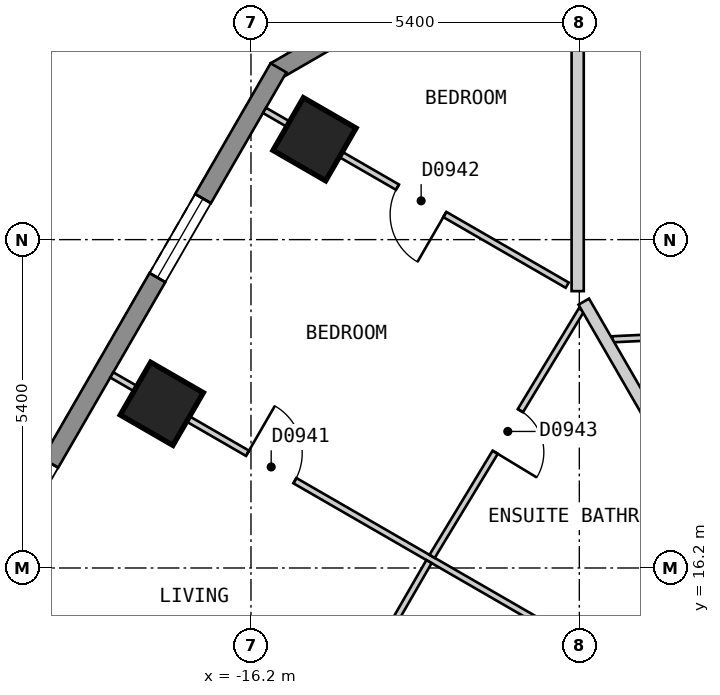
"""IFC4 building model, lengths in metres.
Left out: names, types, materials, properties, quantities, classifications, styles, units other than length and angle.
Written with IfcOpenShell. Run it as: python <this file> out.ifc"""

import sys

from ifc_helpers import new_model, si_unit, direction, frame, frame_2d, origin, origin_2d, place, context, subcontext, project, spatial, polyline, rectangle, outline, extrude, element, fill, save


model = new_model("IFC4")
c1 = context("Model", 3, precision=1e-05, world=origin(), true_north=direction((0.0, 1.0)))
c2 = subcontext(c1, "Body", "Model", "MODEL_VIEW")
j1 = project(units=[si_unit("LENGTHUNIT", "METRE"), si_unit("PLANEANGLEUNIT", "RADIAN")], contexts=[c1])
p1 = place(None, origin())
s1 = spatial("IfcSite", under=j1, at=p1, CompositionType="ELEMENT")
p2 = place(p1, origin())
s2 = spatial("IfcBuilding", under=s1, at=p2, CompositionType="ELEMENT")
p3 = place(p2, frame((0.0, 0.0, 90.0)))
s3 = spatial("IfcBuildingStorey", under=s2, at=p3, CompositionType="ELEMENT", Elevation=90.0)
for number, where, z_axis, x_axis in (
    (1, (-15.155, 23.251, 0.0), (0.0, 0.0, 1.0), (-0.5, -0.866, 0.0)),
    (2, (-17.667, 18.9, 0.0), (0.0, 0.0, 1.0), (-0.5, -0.866, 0.0)),
):
    element("IfcColumn", number, at=place(p3, frame(where, z_axis=z_axis, x_axis=x_axis)), inside=s3, PredefinedType="COLUMN", context=c2, shape_type="SweptSolid", body=[
        extrude(rectangle(XDim=1.0, YDim=1.0, at=origin_2d()), origin(), (0.0, 0.0, 1.0), 3.0),
    ])
p4 = place(p3, frame((-11.472, 26.87, 0.0), z_axis=(0.0, 0.0, 1.0), x_axis=(-0.866022959057, -0.500004234368, 0.0)))
e3 = element("IfcWall", 3, at=p4, inside=s3, PredefinedType="SOLIDWALL", context=c2, shape_type="SweptSolid", body=[
    extrude(outline(polyline([(0.0, -0.15), (5.0, -0.15), (4.92, 0.15), (0.08, 0.15), (0.0, -0.15)])), origin(), (0.0, 0.0, 1.0), 2.7),
])
p5 = place(p4, frame((0.65, 0.0, 0.15)))
e4 = element("IfcOpeningElement", 4, at=p5, cuts=e3, PredefinedType="OPENING", context=c2, shape_type="SweptSolid", body=[
    extrude(rectangle(XDim=1.2, YDim=2.1, at=frame_2d((0.6, 1.05))), frame((0.0, 0.16, 0.0), z_axis=(0.0, -1.0, 0.0), x_axis=(1.0, 0.0, 0.0)), (0.0, 0.0, 1.0), 0.32),
])
p6 = place(p3, frame((-15.747, 24.425, 0.0), z_axis=(0.0, 0.0, 1.0), x_axis=(-0.500027479704, -0.866009537788, 0.0)))
e5 = element("IfcWall", 5, at=p6, inside=s3, PredefinedType="SOLIDWALL", context=c2, shape_type="SweptSolid", body=[
    extrude(outline(polyline([(0.0, -0.15), (26.559, -0.15), (26.478, 0.15), (0.08, 0.15), (0.0, -0.15)])), origin(), (0.0, 0.0, 1.0), 2.7),
])
p7 = place(p6, frame((2.483, 0.0, 0.15)))
e6 = element("IfcOpeningElement", 6, at=p7, cuts=e5, PredefinedType="OPENING", context=c2, shape_type="SweptSolid", body=[
    extrude(rectangle(XDim=1.5, YDim=2.1, at=frame_2d((0.75, 1.05))), frame((0.0, 0.16, 0.0), z_axis=(0.0, -1.0, 0.0), x_axis=(1.0, 0.0, 0.0)), (0.0, 0.0, 1.0), 0.32),
])
p8 = place(p6, frame((7.506, 0.0, 0.15)))
e7 = element("IfcOpeningElement", 7, at=p8, cuts=e5, PredefinedType="OPENING", context=c2, shape_type="SweptSolid", body=[
    extrude(rectangle(XDim=1.5, YDim=2.1, at=frame_2d((0.75, 1.05))), frame((0.0, 0.16, 0.0), z_axis=(0.0, -1.0, 0.0), x_axis=(1.0, 0.0, 0.0)), (0.0, 0.0, 1.0), 0.32),
])
p9 = place(p6, frame((12.529, 0.0, 0.15)))
e8 = element("IfcOpeningElement", 8, at=p9, cuts=e5, PredefinedType="OPENING", context=c2, shape_type="SweptSolid", body=[
    extrude(rectangle(XDim=1.5, YDim=2.1, at=frame_2d((0.75, 1.05))), frame((0.0, 0.16, 0.0), z_axis=(0.0, -1.0, 0.0), x_axis=(1.0, 0.0, 0.0)), (0.0, 0.0, 1.0), 0.32),
])
p10 = place(p6, frame((17.552, 0.0, 0.15)))
e9 = element("IfcOpeningElement", 9, at=p10, cuts=e5, PredefinedType="OPENING", context=c2, shape_type="SweptSolid", body=[
    extrude(rectangle(XDim=1.5, YDim=2.1, at=frame_2d((0.75, 1.05))), frame((0.0, 0.16, 0.0), z_axis=(0.0, -1.0, 0.0), x_axis=(1.0, 0.0, 0.0)), (0.0, 0.0, 1.0), 0.32),
])
p11 = place(p6, frame((22.575, 0.0, 0.15)))
e10 = element("IfcOpeningElement", 10, at=p11, cuts=e5, PredefinedType="OPENING", context=c2, shape_type="SweptSolid", body=[
    extrude(rectangle(XDim=1.5, YDim=2.1, at=frame_2d((0.75, 1.05))), frame((0.0, 0.16, 0.0), z_axis=(0.0, -1.0, 0.0), x_axis=(1.0, 0.0, 0.0)), (0.0, 0.0, 1.0), 0.32),
])
p12 = place(p3, frame((-18.562, -0.951, 0.0), z_axis=(0.0, 0.0, 1.0), x_axis=(0.499987097491, 0.866032852923, 0.0)))
e11 = element("IfcWall", 11, at=p12, inside=s3, PredefinedType="PARTITIONING", context=c2, shape_type="SweptSolid", body=[
    extrude(rectangle(XDim=20.15, YDim=0.2, at=frame_2d((10.075, 0.0))), origin(), (0.0, 0.0, 1.0), 2.7),
])
p13 = place(p12, frame((14.627, 0.0, 0.0)))
e12 = element("IfcOpeningElement", 12, at=p13, cuts=e11, PredefinedType="OPENING", context=c2, shape_type="SweptSolid", body=[
    extrude(rectangle(XDim=1.0, YDim=2.1, at=frame_2d((0.5, 1.05))), frame((0.0, 0.11, 0.0), z_axis=(0.0, -1.0, 0.0), x_axis=(1.0, 0.0, 0.0)), (0.0, 0.0, 1.0), 0.22),
])
p14 = place(p12, frame((9.604, 0.0, 0.0)))
e13 = element("IfcOpeningElement", 13, at=p14, cuts=e11, PredefinedType="OPENING", context=c2, shape_type="SweptSolid", body=[
    extrude(rectangle(XDim=1.0, YDim=2.1, at=frame_2d((0.5, 1.05))), frame((0.0, 0.11, 0.0), z_axis=(0.0, -1.0, 0.0), x_axis=(1.0, 0.0, 0.0)), (0.0, 0.0, 1.0), 0.22),
])
p15 = place(p3, frame((-18.489, 19.375, 0.0), z_axis=(0.0, 0.0, 1.0), x_axis=(0.866016855193, -0.500014806302, 0.0)))
e14 = element("IfcWall", 14, at=p15, inside=s3, PredefinedType="PARTITIONING", context=c2, shape_type="SweptSolid", body=[
    extrude(rectangle(XDim=10.0, YDim=0.1, at=frame_2d((5.0, 0.0))), origin(), (0.0, 0.0, 1.0), 2.7),
])
p16 = place(p15, frame((2.577, 0.0, 0.0)))
e15 = element("IfcOpeningElement", 15, at=p16, cuts=e14, PredefinedType="OPENING", context=c2, shape_type="SweptSolid", body=[
    extrude(rectangle(XDim=0.9, YDim=2.1, at=frame_2d((0.45, 1.05))), frame((0.0, 0.06, 0.0), z_axis=(0.0, -1.0, 0.0), x_axis=(1.0, 0.0, 0.0)), (0.0, 0.0, 1.0), 0.12),
])
p17 = place(p3, frame((-15.977, 23.725, 0.0), z_axis=(0.0, 0.0, 1.0), x_axis=(0.866028566888, -0.499994521305, 0.0)))
e16 = element("IfcWall", 16, at=p17, inside=s3, PredefinedType="PARTITIONING", context=c2, shape_type="SweptSolid", body=[
    extrude(rectangle(XDim=5.748, YDim=0.1, at=frame_2d((2.874, 0.0))), origin(), (0.0, 0.0, 1.0), 2.7),
])
p18 = place(p17, frame((2.524, 0.0, 0.0)))
e17 = element("IfcOpeningElement", 17, at=p18, cuts=e16, PredefinedType="OPENING", context=c2, shape_type="SweptSolid", body=[
    extrude(rectangle(XDim=0.9, YDim=2.1, at=frame_2d((0.45, 1.05))), frame((0.0, 0.06, 0.0), z_axis=(0.0, -1.0, 0.0), x_axis=(1.0, 0.0, 0.0)), (0.0, 0.0, 1.0), 0.12),
])
p19 = place(p3, frame((-13.221, 16.391, 0.0), z_axis=(0.0, 0.0, 1.0), x_axis=(0.518164725284, 0.855280841286, 0.0)))
e18 = element("IfcWall", 18, at=p19, inside=s3, PredefinedType="PARTITIONING", context=c2, shape_type="SweptSolid", body=[
    extrude(rectangle(XDim=4.74, YDim=0.1, at=frame_2d((2.37, 0.0))), origin(), (0.0, 0.0, 1.0), 2.7),
])
p20 = place(p19, frame((2.002, 0.0, 0.0)))
e19 = element("IfcOpeningElement", 19, at=p20, cuts=e18, PredefinedType="OPENING", context=c2, shape_type="SweptSolid", body=[
    extrude(rectangle(XDim=0.8, YDim=2.1, at=frame_2d((0.4, 1.05))), frame((0.0, 0.06, 0.0), z_axis=(0.0, -1.0, 0.0), x_axis=(1.0, 0.0, 0.0)), (0.0, 0.0, 1.0), 0.12),
])
p21 = place(p3, frame((-15.708, 12.085, 0.0), z_axis=(0.0, 0.0, 1.0), x_axis=(0.499943653708, 0.866057932887, 0.0)))
e20 = element("IfcWall", 20, at=p21, inside=s3, PredefinedType="PARTITIONING", context=c2, shape_type="SweptSolid", body=[
    extrude(rectangle(XDim=4.873, YDim=0.1, at=frame_2d((2.436, 0.0))), origin(), (0.0, 0.0, 1.0), 2.7),
])
p22 = place(p21, frame((1.962, 0.0, 0.0)))
e21 = element("IfcOpeningElement", 21, at=p22, cuts=e20, PredefinedType="OPENING", context=c2, shape_type="SweptSolid", body=[
    extrude(rectangle(XDim=0.9, YDim=2.1, at=frame_2d((0.45, 1.05))), frame((0.0, 0.06, 0.0), z_axis=(0.0, -1.0, 0.0), x_axis=(1.0, 0.0, 0.0)), (0.0, 0.0, 1.0), 0.12),
])
p23 = place(p3, frame((-10.254, 19.961, 0.0), z_axis=(0.0, 0.0, 1.0), x_axis=(0.998851840647, 0.047906162812, 0.0)))
e22 = element("IfcWall", 22, at=p23, inside=s3, PredefinedType="PARTITIONING", context=c2, shape_type="SweptSolid", body=[
    extrude(rectangle(XDim=1.463, YDim=0.1, at=frame_2d((0.731, 0.0))), origin(), (0.0, 0.0, 1.0), 2.7),
])
p24 = place(p3, frame((-10.727, 20.58, 0.0), z_axis=(0.0, 0.0, 1.0), x_axis=(0.500041272028, -0.866001574057, 0.0)))
e23 = element("IfcWall", 23, at=p24, inside=s3, PredefinedType="PARTITIONING", context=c2, shape_type="SweptSolid", body=[
    extrude(rectangle(XDim=4.596, YDim=0.2, at=frame_2d((2.298, 0.0))), origin(), (0.0, 0.0, 1.0), 2.7),
])
p25 = place(p3, frame((-10.827, 20.753, 0.0), z_axis=(0.0, 0.0, 1.0), x_axis=(0.0, 1.0, 0.0)))
e24 = element("IfcWall", 24, at=p25, inside=s3, PredefinedType="PARTITIONING", context=c2, shape_type="SweptSolid", body=[
    extrude(rectangle(XDim=5.947, YDim=0.2, at=frame_2d((2.974, 0.0))), origin(), (0.0, 0.0, 1.0), 2.7),
])
p26 = place(p7, origin())
e25 = element("IfcWindow", 25, at=p26, inside=s3, PartitioningType="SINGLE_PANEL", PredefinedType="WINDOW", context=c2, shape_type="SweptSolid", body=[
    extrude(rectangle(XDim=1.5, YDim=2.1, at=frame_2d((0.75, 1.05))), frame((0.0, 0.03, 0.0), z_axis=(0.0, -1.0, 0.0), x_axis=(1.0, 0.0, 0.0)), (0.0, 0.0, 1.0), 0.06),
])
fill(e6, e25)
p27 = place(p16, origin())
e26 = element("IfcDoor", 26, at=p27, inside=s3, OperationType="SINGLE_SWING_LEFT", PredefinedType="DOOR", context=c2, shape_type="SweptSolid", body=[
    extrude(rectangle(XDim=0.9, YDim=2.1, at=frame_2d((0.45, 1.05))), frame((0.0, 0.025, 0.0), z_axis=(0.0, -1.0, 0.0), x_axis=(1.0, 0.0, 0.0)), (0.0, 0.0, 1.0), 0.05),
])
fill(e15, e26)
p28 = place(p18, origin())
e27 = element("IfcDoor", 27, at=p28, inside=s3, OperationType="SINGLE_SWING_RIGHT", PredefinedType="DOOR", context=c2, shape_type="SweptSolid", body=[
    extrude(rectangle(XDim=0.9, YDim=2.1, at=frame_2d((0.45, 1.05))), frame((0.0, 0.025, 0.0), z_axis=(0.0, -1.0, 0.0), x_axis=(1.0, 0.0, 0.0)), (0.0, 0.0, 1.0), 0.05),
])
fill(e17, e27)
p29 = place(p20, origin())
e28 = element("IfcDoor", 28, at=p29, inside=s3, OperationType="SINGLE_SWING_LEFT", PredefinedType="DOOR", context=c2, shape_type="SweptSolid", body=[
    extrude(rectangle(XDim=0.8, YDim=2.1, at=frame_2d((0.4, 1.05))), frame((0.0, 0.025, 0.0), z_axis=(0.0, -1.0, 0.0), x_axis=(1.0, 0.0, 0.0)), (0.0, 0.0, 1.0), 0.05),
])
fill(e19, e28)
save(model, sys.argv[1])
